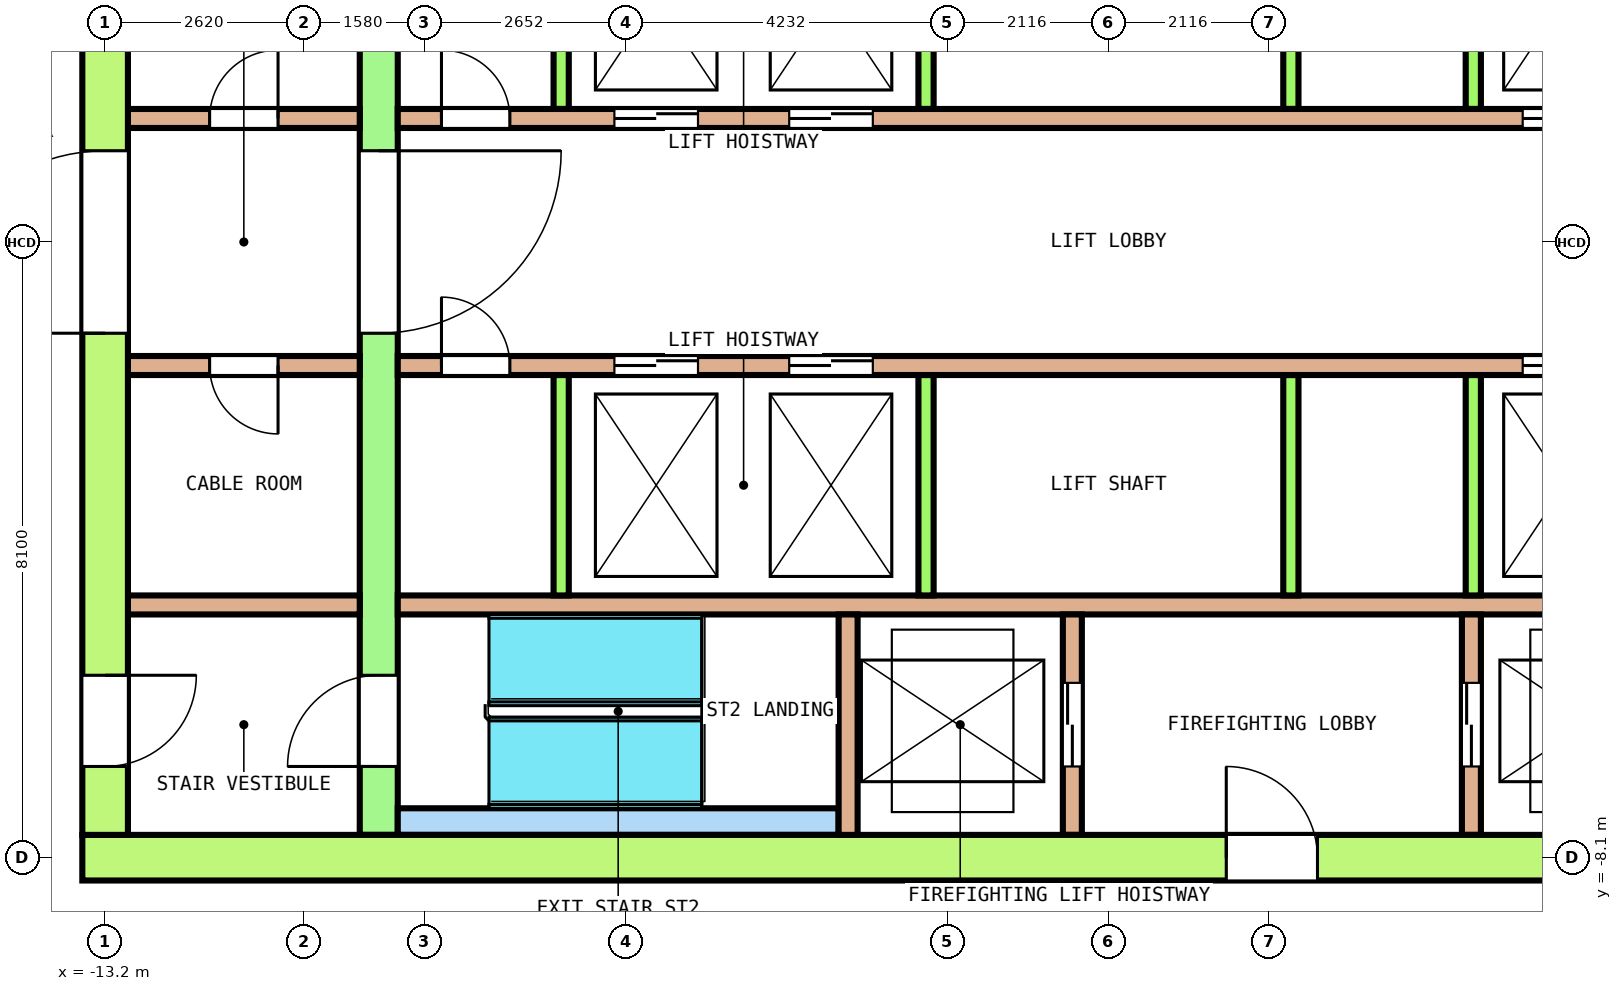
"""IFC4 building model, lengths in metres.
Left out: names, types, materials, properties, quantities, classifications, styles, units other than length and angle.
Written with IfcOpenShell. Run it as: python <this file> out.ifc"""

import sys

from ifc_helpers import new_model, si_unit, direction, frame, frame_2d, origin, place, context, subcontext, project, spatial, rectangle, extrude, element, fill, save


model = new_model("IFC4")
c1 = context("Model", 3, precision=1e-05, world=origin(), true_north=direction((0.0, 1.0)))
c2 = subcontext(c1, "Body", "Model", "MODEL_VIEW")
j1 = project(units=[si_unit("LENGTHUNIT", "METRE"), si_unit("PLANEANGLEUNIT", "RADIAN")], contexts=[c1])
p1 = place(None, origin())
s1 = spatial("IfcSite", under=j1, at=p1, CompositionType="ELEMENT")
p2 = place(p1, origin())
s2 = spatial("IfcBuilding", under=s1, at=p2, CompositionType="ELEMENT")
p3 = place(p2, frame((0.0, 0.0, 211.4)))
s3 = spatial("IfcBuildingStorey", under=s2, at=p3, CompositionType="ELEMENT", Elevation=211.4)
p4 = place(p3, frame((-13.5, -8.1, 0.0), z_axis=(0.0, 0.0, 1.0), x_axis=(1.0, 0.0, 0.0)))
e1 = element("IfcWall", 1, at=p4, inside=s3, PredefinedType="SHEAR", context=c2, shape_type="SweptSolid", body=[
    extrude(rectangle(XDim=27.0, YDim=0.6, at=frame_2d((13.5, 0.0))), origin(), (0.0, 0.0, 1.0), 3.7),
])
p5 = place(p4, frame((15.05, 0.0, 0.0)))
e2 = element("IfcOpeningElement", 2, at=p5, cuts=e1, PredefinedType="OPENING", context=c2, shape_type="SweptSolid", body=[
    extrude(rectangle(XDim=1.2, YDim=2.1, at=frame_2d((0.6, 1.05))), frame((0.0, 0.31, 0.0), z_axis=(0.0, -1.0, 0.0), x_axis=(1.0, 0.0, 0.0)), (0.0, 0.0, 1.0), 0.62),
])
p6 = place(p3, frame((-13.2, -7.8, 0.0), z_axis=(0.0, 0.0, 1.0), x_axis=(0.0, 1.0, 0.0)))
e3 = element("IfcWall", 3, at=p6, inside=s3, PredefinedType="SHEAR", context=c2, shape_type="SweptSolid", body=[
    extrude(rectangle(XDim=15.6, YDim=0.6, at=frame_2d((7.8, 0.0))), origin(), (0.0, 0.0, 1.0), 3.7),
])
p7 = place(p6, frame((6.6, 0.0, 0.0)))
e4 = element("IfcOpeningElement", 4, at=p7, cuts=e3, PredefinedType="OPENING", context=c2, shape_type="SweptSolid", body=[
    extrude(rectangle(XDim=2.4, YDim=2.1, at=frame_2d((1.2, 1.05))), frame((0.0, 0.31, 0.0), z_axis=(0.0, -1.0, 0.0), x_axis=(1.0, 0.0, 0.0)), (0.0, 0.0, 1.0), 0.62),
])
p8 = place(p6, frame((13.5, 0.0, 0.0)))
e5 = element("IfcOpeningElement", 5, at=p8, cuts=e3, PredefinedType="OPENING", context=c2, shape_type="SweptSolid", body=[
    extrude(rectangle(XDim=1.2, YDim=2.1, at=frame_2d((0.6, 1.05))), frame((0.0, 0.31, 0.0), z_axis=(0.0, -1.0, 0.0), x_axis=(1.0, 0.0, 0.0)), (0.0, 0.0, 1.0), 0.62),
])
p9 = place(p6, frame((0.9, 0.0, 0.0)))
e6 = element("IfcOpeningElement", 6, at=p9, cuts=e3, PredefinedType="OPENING", context=c2, shape_type="SweptSolid", body=[
    extrude(rectangle(XDim=1.2, YDim=2.1, at=frame_2d((0.6, 1.05))), frame((0.0, 0.31, 0.0), z_axis=(0.0, -1.0, 0.0), x_axis=(1.0, 0.0, 0.0)), (0.0, 0.0, 1.0), 0.62),
])
p10 = place(p3, frame((-9.6, -7.8, 0.0), z_axis=(0.0, 0.0, 1.0), x_axis=(0.0, 1.0, 0.0)))
e7 = element("IfcWall", 7, at=p10, inside=s3, PredefinedType="SHEAR", context=c2, shape_type="SweptSolid", body=[
    extrude(rectangle(XDim=15.6, YDim=0.5, at=frame_2d((7.8, 0.0))), origin(), (0.0, 0.0, 1.0), 3.7),
])
p11 = place(p10, frame((6.6, 0.0, 0.0)))
e8 = element("IfcOpeningElement", 8, at=p11, cuts=e7, PredefinedType="OPENING", context=c2, shape_type="SweptSolid", body=[
    extrude(rectangle(XDim=2.4, YDim=2.1, at=frame_2d((1.2, 1.05))), frame((0.0, 0.26, 0.0), z_axis=(0.0, -1.0, 0.0), x_axis=(1.0, 0.0, 0.0)), (0.0, 0.0, 1.0), 0.52),
])
p12 = place(p10, frame((13.5, 0.0, 0.0)))
e9 = element("IfcOpeningElement", 9, at=p12, cuts=e7, PredefinedType="OPENING", context=c2, shape_type="SweptSolid", body=[
    extrude(rectangle(XDim=1.2, YDim=2.1, at=frame_2d((0.6, 1.05))), frame((0.0, 0.26, 0.0), z_axis=(0.0, -1.0, 0.0), x_axis=(1.0, 0.0, 0.0)), (0.0, 0.0, 1.0), 0.52),
])
p13 = place(p10, frame((0.9, 0.0, 0.0)))
e10 = element("IfcOpeningElement", 10, at=p13, cuts=e7, PredefinedType="OPENING", context=c2, shape_type="SweptSolid", body=[
    extrude(rectangle(XDim=1.2, YDim=2.1, at=frame_2d((0.6, 1.05))), frame((0.0, 0.26, 0.0), z_axis=(0.0, -1.0, 0.0), x_axis=(1.0, 0.0, 0.0)), (0.0, 0.0, 1.0), 0.52),
])
p14 = place(p3, frame((-12.9, 1.625, 0.0), z_axis=(0.0, 0.0, 1.0), x_axis=(1.0, 0.0, 0.0)))
e11 = element("IfcWall", 11, at=p14, inside=s3, PredefinedType="SOLIDWALL", context=c2, shape_type="SweptSolid", body=[
    extrude(rectangle(XDim=3.05, YDim=0.25, at=frame_2d((1.525, 0.0))), origin(), (0.0, 0.0, 1.0), 3.7),
])
p15 = place(p14, frame((1.075, 0.0, 0.0)))
e12 = element("IfcOpeningElement", 12, at=p15, cuts=e11, PredefinedType="OPENING", context=c2, shape_type="SweptSolid", body=[
    extrude(rectangle(XDim=0.9, YDim=2.1, at=frame_2d((0.45, 1.05))), frame((0.0, 0.135, 0.0), z_axis=(0.0, -1.0, 0.0), x_axis=(1.0, 0.0, 0.0)), (0.0, 0.0, 1.0), 0.27),
])
p16 = place(p3, frame((-9.35, 1.625, 0.0), z_axis=(0.0, 0.0, 1.0), x_axis=(1.0, 0.0, 0.0)))
e13 = element("IfcWall", 13, at=p16, inside=s3, PredefinedType="SOLIDWALL", context=c2, shape_type="SweptSolid", body=[
    extrude(rectangle(XDim=18.7, YDim=0.25, at=frame_2d((9.35, 0.0))), origin(), (0.0, 0.0, 1.0), 3.7),
])
p17 = place(p16, frame((2.85, 0.0, 0.0)))
e14 = element("IfcOpeningElement", 14, at=p17, cuts=e13, PredefinedType="OPENING", context=c2, shape_type="SweptSolid", body=[
    extrude(rectangle(XDim=1.1, YDim=2.1, at=frame_2d((0.55, 1.05))), frame((0.0, 0.135, 0.0), z_axis=(0.0, -1.0, 0.0), x_axis=(1.0, 0.0, 0.0)), (0.0, 0.0, 1.0), 0.27),
])
p18 = place(p16, frame((5.15, 0.0, 0.0)))
e15 = element("IfcOpeningElement", 15, at=p18, cuts=e13, PredefinedType="OPENING", context=c2, shape_type="SweptSolid", body=[
    extrude(rectangle(XDim=1.1, YDim=2.1, at=frame_2d((0.55, 1.05))), frame((0.0, 0.135, 0.0), z_axis=(0.0, -1.0, 0.0), x_axis=(1.0, 0.0, 0.0)), (0.0, 0.0, 1.0), 0.27),
])
p19 = place(p16, frame((14.8, 0.0, 0.0)))
e16 = element("IfcOpeningElement", 16, at=p19, cuts=e13, PredefinedType="OPENING", context=c2, shape_type="SweptSolid", body=[
    extrude(rectangle(XDim=1.1, YDim=2.1, at=frame_2d((0.55, 1.05))), frame((0.0, 0.135, 0.0), z_axis=(0.0, -1.0, 0.0), x_axis=(1.0, 0.0, 0.0)), (0.0, 0.0, 1.0), 0.27),
])
p20 = place(p16, frame((0.575, 0.0, 0.0)))
e17 = element("IfcOpeningElement", 17, at=p20, cuts=e13, PredefinedType="OPENING", context=c2, shape_type="SweptSolid", body=[
    extrude(rectangle(XDim=0.9, YDim=2.1, at=frame_2d((0.45, 1.05))), frame((0.0, 0.135, 0.0), z_axis=(0.0, -1.0, 0.0), x_axis=(1.0, 0.0, 0.0)), (0.0, 0.0, 1.0), 0.27),
])
p21 = place(p16, frame((17.225, 0.0, 0.0)))
e18 = element("IfcOpeningElement", 18, at=p21, cuts=e13, PredefinedType="OPENING", context=c2, shape_type="SweptSolid", body=[
    extrude(rectangle(XDim=0.9, YDim=2.1, at=frame_2d((0.45, 1.05))), frame((0.0, 0.135, 0.0), z_axis=(0.0, -1.0, 0.0), x_axis=(1.0, 0.0, 0.0)), (0.0, 0.0, 1.0), 0.27),
])
for number, where, z_axis, x_axis in (
    (19, (-7.2, 1.75, 0.0), (0.0, 0.0, 1.0), (0.0, 1.0, 0.0)),
    (20, (-2.4, 1.75, 0.0), (0.0, 0.0, 1.0), (0.0, 1.0, 0.0)),
    (21, (2.4, 1.75, 0.0), (0.0, 0.0, 1.0), (0.0, 1.0, 0.0)),
    (22, (4.8, 1.75, 0.0), (0.0, 0.0, 1.0), (0.0, 1.0, 0.0)),
):
    element("IfcWall", number, at=place(p3, frame(where, z_axis=z_axis, x_axis=x_axis)), inside=s3, PredefinedType="SOLIDWALL", context=c2, shape_type="SweptSolid", body=[
        extrude(rectangle(XDim=2.9, YDim=0.2, at=frame_2d((1.45, 0.0))), origin(), (0.0, 0.0, 1.0), 3.7),
    ])
p22 = place(p3, frame((-12.9, -1.625, 0.0), z_axis=(0.0, 0.0, 1.0), x_axis=(1.0, 0.0, 0.0)))
e23 = element("IfcWall", 23, at=p22, inside=s3, PredefinedType="SOLIDWALL", context=c2, shape_type="SweptSolid", body=[
    extrude(rectangle(XDim=3.05, YDim=0.25, at=frame_2d((1.525, 0.0))), origin(), (0.0, 0.0, 1.0), 3.7),
])
p23 = place(p22, frame((1.075, 0.0, 0.0)))
e24 = element("IfcOpeningElement", 24, at=p23, cuts=e23, PredefinedType="OPENING", context=c2, shape_type="SweptSolid", body=[
    extrude(rectangle(XDim=0.9, YDim=2.1, at=frame_2d((0.45, 1.05))), frame((0.0, 0.135, 0.0), z_axis=(0.0, -1.0, 0.0), x_axis=(1.0, 0.0, 0.0)), (0.0, 0.0, 1.0), 0.27),
])
p24 = place(p3, frame((-9.35, -1.625, 0.0), z_axis=(0.0, 0.0, 1.0), x_axis=(1.0, 0.0, 0.0)))
e25 = element("IfcWall", 25, at=p24, inside=s3, PredefinedType="SOLIDWALL", context=c2, shape_type="SweptSolid", body=[
    extrude(rectangle(XDim=18.7, YDim=0.25, at=frame_2d((9.35, 0.0))), origin(), (0.0, 0.0, 1.0), 3.7),
])
p25 = place(p24, frame((2.85, 0.0, 0.0)))
e26 = element("IfcOpeningElement", 26, at=p25, cuts=e25, PredefinedType="OPENING", context=c2, shape_type="SweptSolid", body=[
    extrude(rectangle(XDim=1.1, YDim=2.1, at=frame_2d((0.55, 1.05))), frame((0.0, 0.135, 0.0), z_axis=(0.0, -1.0, 0.0), x_axis=(1.0, 0.0, 0.0)), (0.0, 0.0, 1.0), 0.27),
])
p26 = place(p24, frame((5.15, 0.0, 0.0)))
e27 = element("IfcOpeningElement", 27, at=p26, cuts=e25, PredefinedType="OPENING", context=c2, shape_type="SweptSolid", body=[
    extrude(rectangle(XDim=1.1, YDim=2.1, at=frame_2d((0.55, 1.05))), frame((0.0, 0.135, 0.0), z_axis=(0.0, -1.0, 0.0), x_axis=(1.0, 0.0, 0.0)), (0.0, 0.0, 1.0), 0.27),
])
p27 = place(p24, frame((14.8, 0.0, 0.0)))
e28 = element("IfcOpeningElement", 28, at=p27, cuts=e25, PredefinedType="OPENING", context=c2, shape_type="SweptSolid", body=[
    extrude(rectangle(XDim=1.1, YDim=2.1, at=frame_2d((0.55, 1.05))), frame((0.0, 0.135, 0.0), z_axis=(0.0, -1.0, 0.0), x_axis=(1.0, 0.0, 0.0)), (0.0, 0.0, 1.0), 0.27),
])
p28 = place(p24, frame((0.575, 0.0, 0.0)))
e29 = element("IfcOpeningElement", 29, at=p28, cuts=e25, PredefinedType="OPENING", context=c2, shape_type="SweptSolid", body=[
    extrude(rectangle(XDim=0.9, YDim=2.1, at=frame_2d((0.45, 1.05))), frame((0.0, 0.135, 0.0), z_axis=(0.0, -1.0, 0.0), x_axis=(1.0, 0.0, 0.0)), (0.0, 0.0, 1.0), 0.27),
])
p29 = place(p24, frame((17.225, 0.0, 0.0)))
e30 = element("IfcOpeningElement", 30, at=p29, cuts=e25, PredefinedType="OPENING", context=c2, shape_type="SweptSolid", body=[
    extrude(rectangle(XDim=0.9, YDim=2.1, at=frame_2d((0.45, 1.05))), frame((0.0, 0.135, 0.0), z_axis=(0.0, -1.0, 0.0), x_axis=(1.0, 0.0, 0.0)), (0.0, 0.0, 1.0), 0.27),
])
p30 = place(p3, frame((-12.9, -4.775, 0.0), z_axis=(0.0, 0.0, 1.0), x_axis=(1.0, 0.0, 0.0)))
e31 = element("IfcWall", 31, at=p30, inside=s3, PredefinedType="SOLIDWALL", context=c2, shape_type="SweptSolid", body=[
    extrude(rectangle(XDim=3.05, YDim=0.25, at=frame_2d((1.525, 0.0))), origin(), (0.0, 0.0, 1.0), 3.7),
])
p31 = place(p3, frame((-9.35, -4.775, 0.0), z_axis=(0.0, 0.0, 1.0), x_axis=(1.0, 0.0, 0.0)))
e32 = element("IfcWall", 32, at=p31, inside=s3, PredefinedType="SOLIDWALL", context=c2, shape_type="SweptSolid", body=[
    extrude(rectangle(XDim=18.7, YDim=0.25, at=frame_2d((9.35, 0.0))), origin(), (0.0, 0.0, 1.0), 3.7),
])
for number, where, z_axis, x_axis in (
    (33, (-7.2, -4.65, 0.0), (0.0, 0.0, 1.0), (0.0, 1.0, 0.0)),
    (34, (-2.4, -4.65, 0.0), (0.0, 0.0, 1.0), (0.0, 1.0, 0.0)),
    (35, (2.4, -4.65, 0.0), (0.0, 0.0, 1.0), (0.0, 1.0, 0.0)),
    (36, (4.8, -4.65, 0.0), (0.0, 0.0, 1.0), (0.0, 1.0, 0.0)),
):
    element("IfcWall", number, at=place(p3, frame(where, z_axis=z_axis, x_axis=x_axis)), inside=s3, PredefinedType="SOLIDWALL", context=c2, shape_type="SweptSolid", body=[
        extrude(rectangle(XDim=2.9, YDim=0.2, at=frame_2d((1.45, 0.0))), origin(), (0.0, 0.0, 1.0), 3.7),
    ])
p32 = place(p3, frame((-9.35, -7.625, 0.0), z_axis=(0.0, 0.0, 1.0), x_axis=(1.0, 0.0, 0.0)))
e37 = element("IfcWall", 37, at=p32, inside=s3, PredefinedType="SOLIDWALL", context=c2, shape_type="SweptSolid", body=[
    extrude(rectangle(XDim=5.8, YDim=0.35, at=frame_2d((2.9, 0.0))), origin(), (0.0, 0.0, 1.0), 3.7),
])
p33 = place(p3, frame((-3.425, -7.8, 0.0), z_axis=(0.0, 0.0, 1.0), x_axis=(0.0, 1.0, 0.0)))
e38 = element("IfcWall", 38, at=p33, inside=s3, PredefinedType="SOLIDWALL", context=c2, shape_type="SweptSolid", body=[
    extrude(rectangle(XDim=2.9, YDim=0.25, at=frame_2d((1.45, 0.0))), origin(), (0.0, 0.0, 1.0), 3.7),
])
p34 = place(p3, frame((-0.475, -7.8, 0.0), z_axis=(0.0, 0.0, 1.0), x_axis=(0.0, 1.0, 0.0)))
e39 = element("IfcWall", 39, at=p34, inside=s3, PredefinedType="SOLIDWALL", context=c2, shape_type="SweptSolid", body=[
    extrude(rectangle(XDim=2.9, YDim=0.25, at=frame_2d((1.45, 0.0))), origin(), (0.0, 0.0, 1.0), 3.7),
])
p35 = place(p34, frame((0.9, 0.0, 0.0)))
e40 = element("IfcOpeningElement", 40, at=p35, cuts=e39, PredefinedType="OPENING", context=c2, shape_type="SweptSolid", body=[
    extrude(rectangle(XDim=1.1, YDim=2.1, at=frame_2d((0.55, 1.05))), frame((0.0, 0.135, 0.0), z_axis=(0.0, -1.0, 0.0), x_axis=(1.0, 0.0, 0.0)), (0.0, 0.0, 1.0), 0.27),
])
p36 = place(p3, frame((4.775, -7.8, 0.0), z_axis=(0.0, 0.0, 1.0), x_axis=(0.0, 1.0, 0.0)))
e41 = element("IfcWall", 41, at=p36, inside=s3, PredefinedType="SOLIDWALL", context=c2, shape_type="SweptSolid", body=[
    extrude(rectangle(XDim=2.9, YDim=0.25, at=frame_2d((1.45, 0.0))), origin(), (0.0, 0.0, 1.0), 3.7),
])
p37 = place(p36, frame((0.9, 0.0, 0.0)))
e42 = element("IfcOpeningElement", 42, at=p37, cuts=e41, PredefinedType="OPENING", context=c2, shape_type="SweptSolid", body=[
    extrude(rectangle(XDim=1.1, YDim=2.1, at=frame_2d((0.55, 1.05))), frame((0.0, 0.135, 0.0), z_axis=(0.0, -1.0, 0.0), x_axis=(1.0, 0.0, 0.0)), (0.0, 0.0, 1.0), 0.27),
])
p38 = place(p17, origin())
e43 = element("IfcDoor", 43, at=p38, inside=s3, OperationType="DOUBLE_DOOR_SLIDING", PredefinedType="DOOR", context=c2, shape_type="SweptSolid", body=[
    extrude(rectangle(XDim=1.1, YDim=2.1, at=frame_2d((0.55, 1.05))), frame((0.0, 0.075, 0.0), z_axis=(0.0, -1.0, 0.0), x_axis=(1.0, 0.0, 0.0)), (0.0, 0.0, 1.0), 0.15),
])
fill(e14, e43)
p39 = place(p18, origin())
e44 = element("IfcDoor", 44, at=p39, inside=s3, OperationType="DOUBLE_DOOR_SLIDING", PredefinedType="DOOR", context=c2, shape_type="SweptSolid", body=[
    extrude(rectangle(XDim=1.1, YDim=2.1, at=frame_2d((0.55, 1.05))), frame((0.0, 0.075, 0.0), z_axis=(0.0, -1.0, 0.0), x_axis=(1.0, 0.0, 0.0)), (0.0, 0.0, 1.0), 0.15),
])
fill(e15, e44)
p40 = place(p19, origin())
e45 = element("IfcDoor", 45, at=p40, inside=s3, OperationType="DOUBLE_DOOR_SLIDING", PredefinedType="DOOR", context=c2, shape_type="SweptSolid", body=[
    extrude(rectangle(XDim=1.1, YDim=2.1, at=frame_2d((0.55, 1.05))), frame((0.0, 0.075, 0.0), z_axis=(0.0, -1.0, 0.0), x_axis=(1.0, 0.0, 0.0)), (0.0, 0.0, 1.0), 0.15),
])
fill(e16, e45)
p41 = place(p25, origin())
e46 = element("IfcDoor", 46, at=p41, inside=s3, OperationType="DOUBLE_DOOR_SLIDING", PredefinedType="DOOR", context=c2, shape_type="SweptSolid", body=[
    extrude(rectangle(XDim=1.1, YDim=2.1, at=frame_2d((0.55, 1.05))), frame((0.0, 0.075, 0.0), z_axis=(0.0, -1.0, 0.0), x_axis=(1.0, 0.0, 0.0)), (0.0, 0.0, 1.0), 0.15),
])
fill(e26, e46)
p42 = place(p26, origin())
e47 = element("IfcDoor", 47, at=p42, inside=s3, OperationType="DOUBLE_DOOR_SLIDING", PredefinedType="DOOR", context=c2, shape_type="SweptSolid", body=[
    extrude(rectangle(XDim=1.1, YDim=2.1, at=frame_2d((0.55, 1.05))), frame((0.0, 0.075, 0.0), z_axis=(0.0, -1.0, 0.0), x_axis=(1.0, 0.0, 0.0)), (0.0, 0.0, 1.0), 0.15),
])
fill(e27, e47)
p43 = place(p27, origin())
e48 = element("IfcDoor", 48, at=p43, inside=s3, OperationType="DOUBLE_DOOR_SLIDING", PredefinedType="DOOR", context=c2, shape_type="SweptSolid", body=[
    extrude(rectangle(XDim=1.1, YDim=2.1, at=frame_2d((0.55, 1.05))), frame((0.0, 0.075, 0.0), z_axis=(0.0, -1.0, 0.0), x_axis=(1.0, 0.0, 0.0)), (0.0, 0.0, 1.0), 0.15),
])
fill(e28, e48)
p44 = place(p35, origin())
e49 = element("IfcDoor", 49, at=p44, inside=s3, OperationType="DOUBLE_DOOR_SLIDING", PredefinedType="DOOR", context=c2, shape_type="SweptSolid", body=[
    extrude(rectangle(XDim=1.1, YDim=2.1, at=frame_2d((0.55, 1.05))), frame((0.0, 0.075, 0.0), z_axis=(0.0, -1.0, 0.0), x_axis=(1.0, 0.0, 0.0)), (0.0, 0.0, 1.0), 0.15),
])
fill(e40, e49)
p45 = place(p37, origin())
e50 = element("IfcDoor", 50, at=p45, inside=s3, OperationType="DOUBLE_DOOR_SLIDING", PredefinedType="DOOR", context=c2, shape_type="SweptSolid", body=[
    extrude(rectangle(XDim=1.1, YDim=2.1, at=frame_2d((0.55, 1.05))), frame((0.0, 0.075, 0.0), z_axis=(0.0, -1.0, 0.0), x_axis=(1.0, 0.0, 0.0)), (0.0, 0.0, 1.0), 0.15),
])
fill(e42, e50)
p46 = place(p11, origin())
e51 = element("IfcDoor", 51, at=p46, inside=s3, OperationType="DOUBLE_DOOR_SINGLE_SWING", PredefinedType="DOOR", context=c2, shape_type="SweptSolid", body=[
    extrude(rectangle(XDim=2.4, YDim=2.1, at=frame_2d((1.2, 1.05))), frame((0.0, 0.2, 0.0), z_axis=(0.0, -1.0, 0.0), x_axis=(1.0, 0.0, 0.0)), (0.0, 0.0, 1.0), 0.4),
])
fill(e8, e51)
p47 = place(p7, origin())
e52 = element("IfcDoor", 52, at=p47, inside=s3, OperationType="DOUBLE_DOOR_SINGLE_SWING", PredefinedType="DOOR", context=c2, shape_type="SweptSolid", body=[
    extrude(rectangle(XDim=2.4, YDim=2.1, at=frame_2d((1.2, 1.05))), frame((0.0, 0.25, 0.0), z_axis=(0.0, -1.0, 0.0), x_axis=(1.0, 0.0, 0.0)), (0.0, 0.0, 1.0), 0.5),
])
fill(e4, e52)
p48 = place(p13, origin())
e53 = element("IfcDoor", 53, at=p48, inside=s3, OperationType="SINGLE_SWING_RIGHT", PredefinedType="DOOR", context=c2, shape_type="SweptSolid", body=[
    extrude(rectangle(XDim=1.2, YDim=2.1, at=frame_2d((0.6, 1.05))), frame((0.0, 0.2, 0.0), z_axis=(0.0, -1.0, 0.0), x_axis=(1.0, 0.0, 0.0)), (0.0, 0.0, 1.0), 0.4),
])
fill(e10, e53)
p49 = place(p9, origin())
e54 = element("IfcDoor", 54, at=p49, inside=s3, OperationType="SINGLE_SWING_LEFT", PredefinedType="DOOR", context=c2, shape_type="SweptSolid", body=[
    extrude(rectangle(XDim=1.2, YDim=2.1, at=frame_2d((0.6, 1.05))), frame((0.0, 0.25, 0.0), z_axis=(0.0, -1.0, 0.0), x_axis=(1.0, 0.0, 0.0)), (0.0, 0.0, 1.0), 0.5),
])
fill(e6, e54)
p50 = place(p5, origin())
e55 = element("IfcDoor", 55, at=p50, inside=s3, OperationType="SINGLE_SWING_RIGHT", PredefinedType="DOOR", context=c2, shape_type="SweptSolid", body=[
    extrude(rectangle(XDim=1.2, YDim=2.1, at=frame_2d((0.6, 1.05))), frame((0.0, 0.25, 0.0), z_axis=(0.0, -1.0, 0.0), x_axis=(1.0, 0.0, 0.0)), (0.0, 0.0, 1.0), 0.5),
])
fill(e2, e55)
p51 = place(p15, origin())
e56 = element("IfcDoor", 56, at=p51, inside=s3, OperationType="SINGLE_SWING_RIGHT", PredefinedType="DOOR", context=c2, shape_type="SweptSolid", body=[
    extrude(rectangle(XDim=0.9, YDim=2.1, at=frame_2d((0.45, 1.05))), frame((0.0, 0.075, 0.0), z_axis=(0.0, -1.0, 0.0), x_axis=(1.0, 0.0, 0.0)), (0.0, 0.0, 1.0), 0.15),
])
fill(e12, e56)
p52 = place(p20, origin())
e57 = element("IfcDoor", 57, at=p52, inside=s3, OperationType="SINGLE_SWING_LEFT", PredefinedType="DOOR", context=c2, shape_type="SweptSolid", body=[
    extrude(rectangle(XDim=0.9, YDim=2.1, at=frame_2d((0.45, 1.05))), frame((0.0, 0.075, 0.0), z_axis=(0.0, -1.0, 0.0), x_axis=(1.0, 0.0, 0.0)), (0.0, 0.0, 1.0), 0.15),
])
fill(e17, e57)
p53 = place(p23, origin())
e58 = element("IfcDoor", 58, at=p53, inside=s3, OperationType="SINGLE_SWING_RIGHT", PredefinedType="DOOR", context=c2, shape_type="SweptSolid", body=[
    extrude(rectangle(XDim=0.9, YDim=2.1, at=frame_2d((0.45, 1.05))), frame((0.0, 0.075, 0.0), z_axis=(0.0, -1.0, 0.0), x_axis=(1.0, 0.0, 0.0)), (0.0, 0.0, 1.0), 0.15),
])
fill(e24, e58)
p54 = place(p28, origin())
e59 = element("IfcDoor", 59, at=p54, inside=s3, OperationType="SINGLE_SWING_LEFT", PredefinedType="DOOR", context=c2, shape_type="SweptSolid", body=[
    extrude(rectangle(XDim=0.9, YDim=2.1, at=frame_2d((0.45, 1.05))), frame((0.0, 0.075, 0.0), z_axis=(0.0, -1.0, 0.0), x_axis=(1.0, 0.0, 0.0)), (0.0, 0.0, 1.0), 0.15),
])
fill(e29, e59)
save(model, sys.argv[1])
